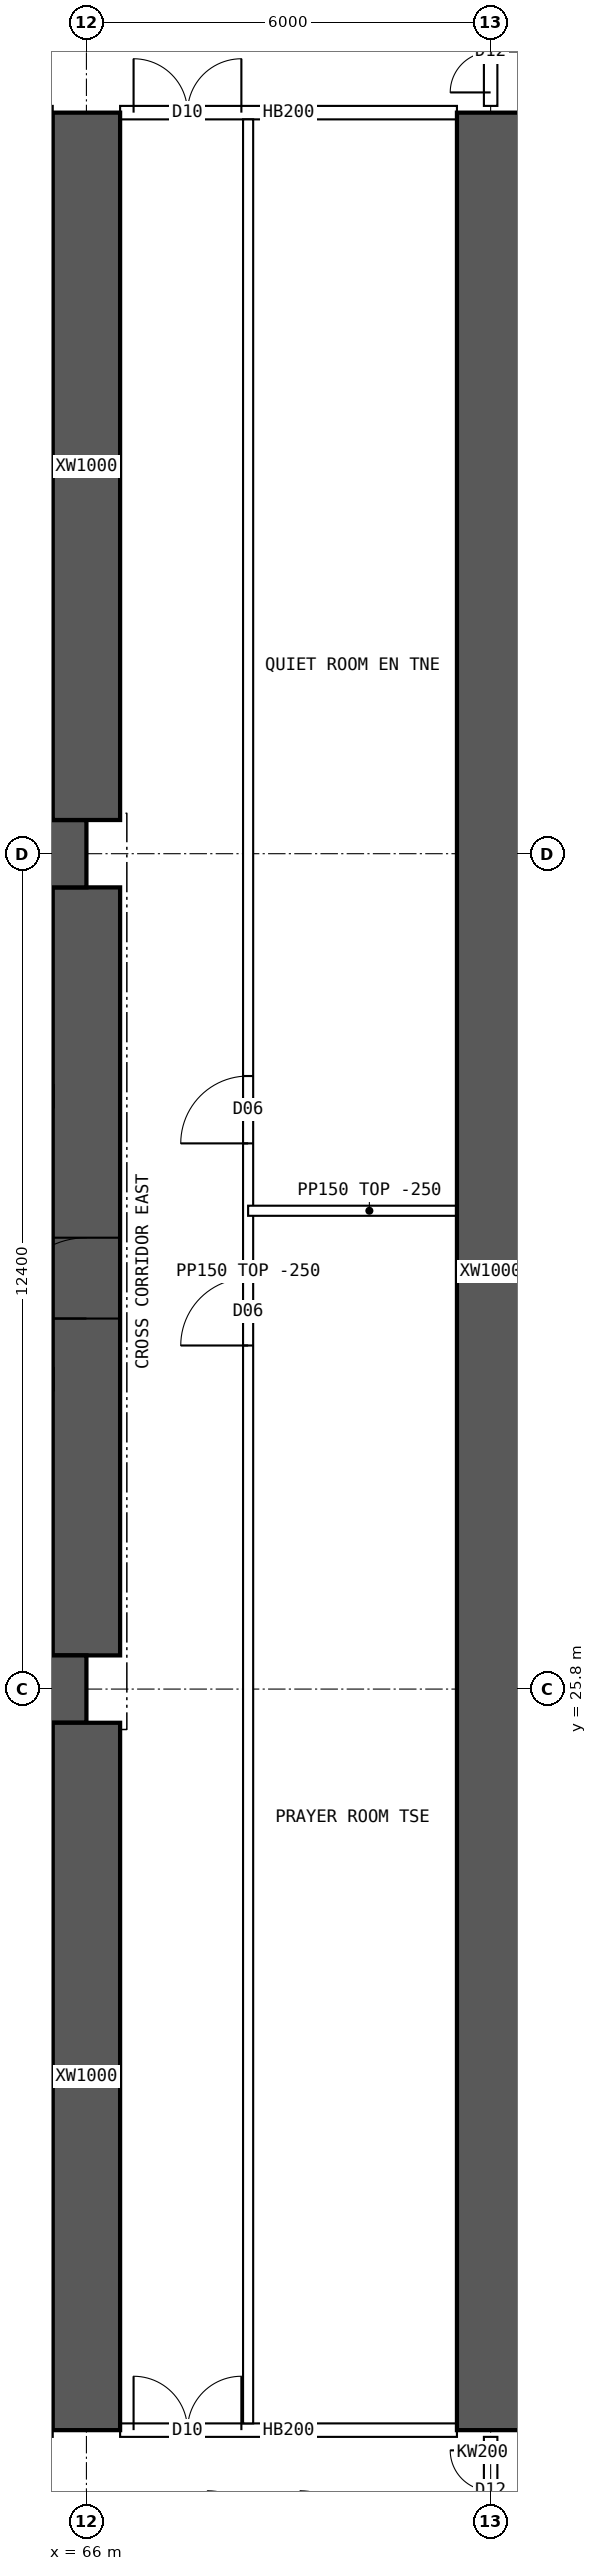
"""IFC4 building model, lengths in metres.
Left out: names, types, materials, properties, quantities, classifications, styles, units other than length and angle.
Written with IfcOpenShell. Run it as: python <this file> out.ifc"""

import sys

from ifc_helpers import new_model, si_unit, direction, frame, frame_2d, origin, place, context, subcontext, project, spatial, polyline, rectangle, outline, extrude, element, fill, save


model = new_model("IFC4")
c1 = context("Model", 3, precision=1e-05, world=origin(), true_north=direction((0.0, 1.0)))
c2 = subcontext(c1, "Body", "Model", "MODEL_VIEW")
j1 = project(units=[si_unit("LENGTHUNIT", "METRE"), si_unit("PLANEANGLEUNIT", "RADIAN")], contexts=[c1])
p1 = place(None, origin())
s1 = spatial("IfcSite", under=j1, at=p1, CompositionType="ELEMENT")
p2 = place(p1, origin())
s2 = spatial("IfcBuilding", under=s1, at=p2, CompositionType="ELEMENT")
p3 = place(p2, frame((0.0, 0.0, 61.45)))
s3 = spatial("IfcBuildingStorey", under=s2, at=p3, CompositionType="ELEMENT", Elevation=61.45)
for number, where, z_axis, x_axis in (
    (1, (18.0, 25.8, 0.0), (0.0, 0.0, 1.0), (1.0, 0.0, 0.0)),
    (2, (18.0, 38.2, 0.0), (0.0, 0.0, 1.0), (1.0, 0.0, 0.0)),
):
    element("IfcWall", number, at=place(p3, frame(where, z_axis=z_axis, x_axis=x_axis)), inside=s3, PredefinedType="SHEAR", context=c2, shape_type="SweptSolid", body=[
        extrude(rectangle(XDim=48.0, YDim=1.0, at=frame_2d((24.0, 0.0))), origin(), (0.0, 0.0, 1.0), 3.75),
    ])
p4 = place(p3, frame((66.0, 26.3, 0.0), z_axis=(0.0, 0.0, 1.0), x_axis=(0.0, 1.0, 0.0)))
e3 = element("IfcWall", 3, at=p4, inside=s3, PredefinedType="SHEAR", context=c2, shape_type="SweptSolid", body=[
    extrude(rectangle(XDim=11.4, YDim=1.0, at=frame_2d((5.7, 0.0))), origin(), (0.0, 0.0, 1.0), 3.75),
])
p5 = place(p4, frame((5.0, 0.0, 0.0)))
e4 = element("IfcOpeningElement", 4, at=p5, cuts=e3, PredefinedType="OPENING", context=c2, shape_type="SweptSolid", body=[
    extrude(rectangle(XDim=1.2, YDim=2.1, at=frame_2d((0.6, 1.05))), frame((0.0, 0.51, 0.0), z_axis=(0.0, -1.0, 0.0), x_axis=(1.0, 0.0, 0.0)), (0.0, 0.0, 1.0), 1.02),
])
for number, where, z_axis, x_axis in (
    (5, (66.0, 14.8, 0.0), (0.0, 0.0, 1.0), (0.0, 1.0, 0.0)),
    (6, (66.0, 38.7, 0.0), (0.0, 0.0, 1.0), (0.0, 1.0, 0.0)),
):
    element("IfcWall", number, at=place(p3, frame(where, z_axis=z_axis, x_axis=x_axis)), inside=s3, PredefinedType="SHEAR", context=c2, shape_type="SweptSolid", body=[
        extrude(rectangle(XDim=10.5, YDim=1.0, at=frame_2d((5.25, 0.0))), origin(), (0.0, 0.0, 1.0), 3.75),
    ])
p6 = place(p3, frame((72.0, 14.8, 0.0), z_axis=(0.0, 0.0, 1.0), x_axis=(0.0, 1.0, 0.0)))
e7 = element("IfcWall", 7, at=p6, inside=s3, PredefinedType="SHEAR", context=c2, shape_type="SweptSolid", body=[
    extrude(rectangle(XDim=34.4, YDim=1.0, at=frame_2d((17.2, 0.0))), origin(), (0.0, 0.0, 1.0), 3.75),
])
p7 = place(p3, frame((66.5, 14.8, 0.0), z_axis=(0.0, 0.0, 1.0), x_axis=(1.0, 0.0, 0.0)))
e8 = element("IfcWall", 8, at=p7, inside=s3, PredefinedType="SOLIDWALL", context=c2, shape_type="SweptSolid", body=[
    extrude(rectangle(XDim=5.0, YDim=0.2, at=frame_2d((2.5, 0.0))), origin(), (0.0, 0.0, 1.0), 3.5),
])
p8 = place(p7, frame((0.2, 0.0, 0.0)))
e9 = element("IfcOpeningElement", 9, at=p8, cuts=e8, PredefinedType="OPENING", context=c2, shape_type="SweptSolid", body=[
    extrude(rectangle(XDim=1.6, YDim=2.1, at=frame_2d((0.8, 1.05))), frame((0.0, 0.11, 0.0), z_axis=(0.0, -1.0, 0.0), x_axis=(1.0, 0.0, 0.0)), (0.0, 0.0, 1.0), 0.22),
])
p9 = place(p3, frame((66.5, 49.2, 0.0), z_axis=(0.0, 0.0, 1.0), x_axis=(1.0, 0.0, 0.0)))
e10 = element("IfcWall", 10, at=p9, inside=s3, PredefinedType="SOLIDWALL", context=c2, shape_type="SweptSolid", body=[
    extrude(rectangle(XDim=5.0, YDim=0.2, at=frame_2d((2.5, 0.0))), origin(), (0.0, 0.0, 1.0), 3.5),
])
p10 = place(p9, frame((0.2, 0.0, 0.0)))
e11 = element("IfcOpeningElement", 11, at=p10, cuts=e10, PredefinedType="OPENING", context=c2, shape_type="SweptSolid", body=[
    extrude(rectangle(XDim=1.6, YDim=2.1, at=frame_2d((0.8, 1.05))), frame((0.0, 0.11, 0.0), z_axis=(0.0, -1.0, 0.0), x_axis=(1.0, 0.0, 0.0)), (0.0, 0.0, 1.0), 0.22),
])
p11 = place(p3, frame((68.4, 14.9, 0.0), z_axis=(0.0, 0.0, 1.0), x_axis=(0.0, 1.0, 0.0)))
e12 = element("IfcWall", 12, at=p11, inside=s3, PredefinedType="PARTITIONING", context=c2, shape_type="SweptSolid", body=[
    extrude(rectangle(XDim=34.2, YDim=0.15, at=frame_2d((17.1, 0.0))), origin(), (0.0, 0.0, 1.0), 3.5),
])
p12 = place(p11, frame((16.0, 0.0, 0.0)))
e13 = element("IfcOpeningElement", 13, at=p12, cuts=e12, PredefinedType="OPENING", context=c2, shape_type="SweptSolid", body=[
    extrude(rectangle(XDim=1.0, YDim=2.1, at=frame_2d((0.5, 1.05))), frame((0.0, 0.085, 0.0), z_axis=(0.0, -1.0, 0.0), x_axis=(1.0, 0.0, 0.0)), (0.0, 0.0, 1.0), 0.17),
])
p13 = place(p11, frame((19.0, 0.0, 0.0)))
e14 = element("IfcOpeningElement", 14, at=p13, cuts=e12, PredefinedType="OPENING", context=c2, shape_type="SweptSolid", body=[
    extrude(rectangle(XDim=1.0, YDim=2.1, at=frame_2d((0.5, 1.05))), frame((0.0, 0.085, 0.0), z_axis=(0.0, -1.0, 0.0), x_axis=(1.0, 0.0, 0.0)), (0.0, 0.0, 1.0), 0.17),
])
p14 = place(p3, frame((68.4, 32.9, 0.0), z_axis=(0.0, 0.0, 1.0), x_axis=(1.0, 0.0, 0.0)))
e15 = element("IfcWall", 15, at=p14, inside=s3, PredefinedType="PARTITIONING", context=c2, shape_type="SweptSolid", body=[
    extrude(rectangle(XDim=3.6, YDim=0.15, at=frame_2d((1.8, 0.0))), origin(), (0.0, 0.0, 1.0), 3.5),
])
p15 = place(p3, frame((72.075, 30.85, 0.0), z_axis=(0.0, 0.0, 1.0), x_axis=(1.0, 0.0, 0.0)))
e16 = element("IfcWall", 16, at=p15, inside=s3, PredefinedType="PARTITIONING", context=c2, shape_type="SweptSolid", body=[
    extrude(outline(polyline([(0.0, 0.0), (8.02, 0.0), (8.02, 3.5), (6.227, 3.5), (6.225, 3.05), (5.627, 3.05), (5.625, 3.5), (0.0, 3.5), (0.0, 0.0)])), frame((0.0, 0.075, 0.0), z_axis=(0.0, -1.0, 0.0), x_axis=(1.0, 0.0, 0.0)), (0.0, 0.0, 1.0), 0.15),
])
p16 = place(p3, frame((72.0, 13.1, 0.0), z_axis=(0.0, 0.0, 1.0), x_axis=(0.0, 1.0, 0.0)))
e17 = element("IfcWall", 17, at=p16, inside=s3, PredefinedType="SOLIDWALL", context=c2, shape_type="SweptSolid", body=[
    extrude(outline(polyline([(0.0, 0.0), (1.6, 0.0), (1.6, 3.05), (0.0, 3.05), (0.0, 0.0)])), frame((0.0, 0.1, 0.0), z_axis=(0.0, -1.0, 0.0), x_axis=(1.0, 0.0, 0.0)), (0.0, 0.0, 1.0), 0.2),
])
p17 = place(p16, frame((0.2, 0.0, 0.0)))
e18 = element("IfcOpeningElement", 18, at=p17, cuts=e17, PredefinedType="OPENING", context=c2, shape_type="SweptSolid", body=[
    extrude(rectangle(XDim=1.2, YDim=2.1, at=frame_2d((0.6, 1.05))), frame((0.0, 0.11, 0.0), z_axis=(0.0, -1.0, 0.0), x_axis=(1.0, 0.0, 0.0)), (0.0, 0.0, 1.0), 0.22),
])
p18 = place(p3, frame((72.0, 49.3, 0.0), z_axis=(0.0, 0.0, 1.0), x_axis=(0.0, 1.0, 0.0)))
e19 = element("IfcWall", 19, at=p18, inside=s3, PredefinedType="SOLIDWALL", context=c2, shape_type="SweptSolid", body=[
    extrude(outline(polyline([(0.0, 0.0), (1.6, 0.0), (1.6, 3.05), (0.0, 3.05), (0.0, 0.0)])), frame((0.0, 0.1, 0.0), z_axis=(0.0, -1.0, 0.0), x_axis=(1.0, 0.0, 0.0)), (0.0, 0.0, 1.0), 0.2),
])
p19 = place(p18, frame((0.2, 0.0, 0.0)))
e20 = element("IfcOpeningElement", 20, at=p19, cuts=e19, PredefinedType="OPENING", context=c2, shape_type="SweptSolid", body=[
    extrude(rectangle(XDim=1.2, YDim=2.1, at=frame_2d((0.6, 1.05))), frame((0.0, 0.11, 0.0), z_axis=(0.0, -1.0, 0.0), x_axis=(1.0, 0.0, 0.0)), (0.0, 0.0, 1.0), 0.22),
])
p20 = place(p5, origin())
e21 = element("IfcDoor", 21, at=p20, inside=s3, OperationType="SINGLE_SWING_LEFT", PredefinedType="DOOR", context=c2, shape_type="SweptSolid", body=[
    extrude(rectangle(XDim=1.2, YDim=2.1, at=frame_2d((0.6, 1.05))), frame((0.0, 0.025, 0.0), z_axis=(0.0, -1.0, 0.0), x_axis=(1.0, 0.0, 0.0)), (0.0, 0.0, 1.0), 0.05),
])
fill(e4, e21)
p21 = place(p8, origin())
e22 = element("IfcDoor", 22, at=p21, inside=s3, OperationType="DOUBLE_DOOR_SINGLE_SWING", PredefinedType="DOOR", context=c2, shape_type="SweptSolid", body=[
    extrude(rectangle(XDim=1.6, YDim=2.1, at=frame_2d((0.8, 1.05))), frame((0.0, 0.025, 0.0), z_axis=(0.0, -1.0, 0.0), x_axis=(1.0, 0.0, 0.0)), (0.0, 0.0, 1.0), 0.05),
])
fill(e9, e22)
p22 = place(p10, origin())
e23 = element("IfcDoor", 23, at=p22, inside=s3, OperationType="DOUBLE_DOOR_SINGLE_SWING", PredefinedType="DOOR", context=c2, shape_type="SweptSolid", body=[
    extrude(rectangle(XDim=1.6, YDim=2.1, at=frame_2d((0.8, 1.05))), frame((0.0, 0.025, 0.0), z_axis=(0.0, -1.0, 0.0), x_axis=(1.0, 0.0, 0.0)), (0.0, 0.0, 1.0), 0.05),
])
fill(e11, e23)
p23 = place(p12, origin())
e24 = element("IfcDoor", 24, at=p23, inside=s3, OperationType="SINGLE_SWING_LEFT", PredefinedType="DOOR", context=c2, shape_type="SweptSolid", body=[
    extrude(rectangle(XDim=1.0, YDim=2.1, at=frame_2d((0.5, 1.05))), frame((0.0, 0.025, 0.0), z_axis=(0.0, -1.0, 0.0), x_axis=(1.0, 0.0, 0.0)), (0.0, 0.0, 1.0), 0.05),
])
fill(e13, e24)
p24 = place(p13, origin())
e25 = element("IfcDoor", 25, at=p24, inside=s3, OperationType="SINGLE_SWING_LEFT", PredefinedType="DOOR", context=c2, shape_type="SweptSolid", body=[
    extrude(rectangle(XDim=1.0, YDim=2.1, at=frame_2d((0.5, 1.05))), frame((0.0, 0.025, 0.0), z_axis=(0.0, -1.0, 0.0), x_axis=(1.0, 0.0, 0.0)), (0.0, 0.0, 1.0), 0.05),
])
fill(e14, e25)
p25 = place(p17, origin())
e26 = element("IfcDoor", 26, at=p25, inside=s3, OperationType="DOUBLE_DOOR_SINGLE_SWING", PredefinedType="DOOR", context=c2, shape_type="SweptSolid", body=[
    extrude(rectangle(XDim=1.2, YDim=2.1, at=frame_2d((0.6, 1.05))), frame((0.0, 0.025, 0.0), z_axis=(0.0, -1.0, 0.0), x_axis=(1.0, 0.0, 0.0)), (0.0, 0.0, 1.0), 0.05),
])
fill(e18, e26)
p26 = place(p19, origin())
e27 = element("IfcDoor", 27, at=p26, inside=s3, OperationType="DOUBLE_DOOR_SINGLE_SWING", PredefinedType="DOOR", context=c2, shape_type="SweptSolid", body=[
    extrude(rectangle(XDim=1.2, YDim=2.1, at=frame_2d((0.6, 1.05))), frame((0.0, 0.025, 0.0), z_axis=(0.0, -1.0, 0.0), x_axis=(1.0, 0.0, 0.0)), (0.0, 0.0, 1.0), 0.05),
])
fill(e20, e27)
save(model, sys.argv[1])
